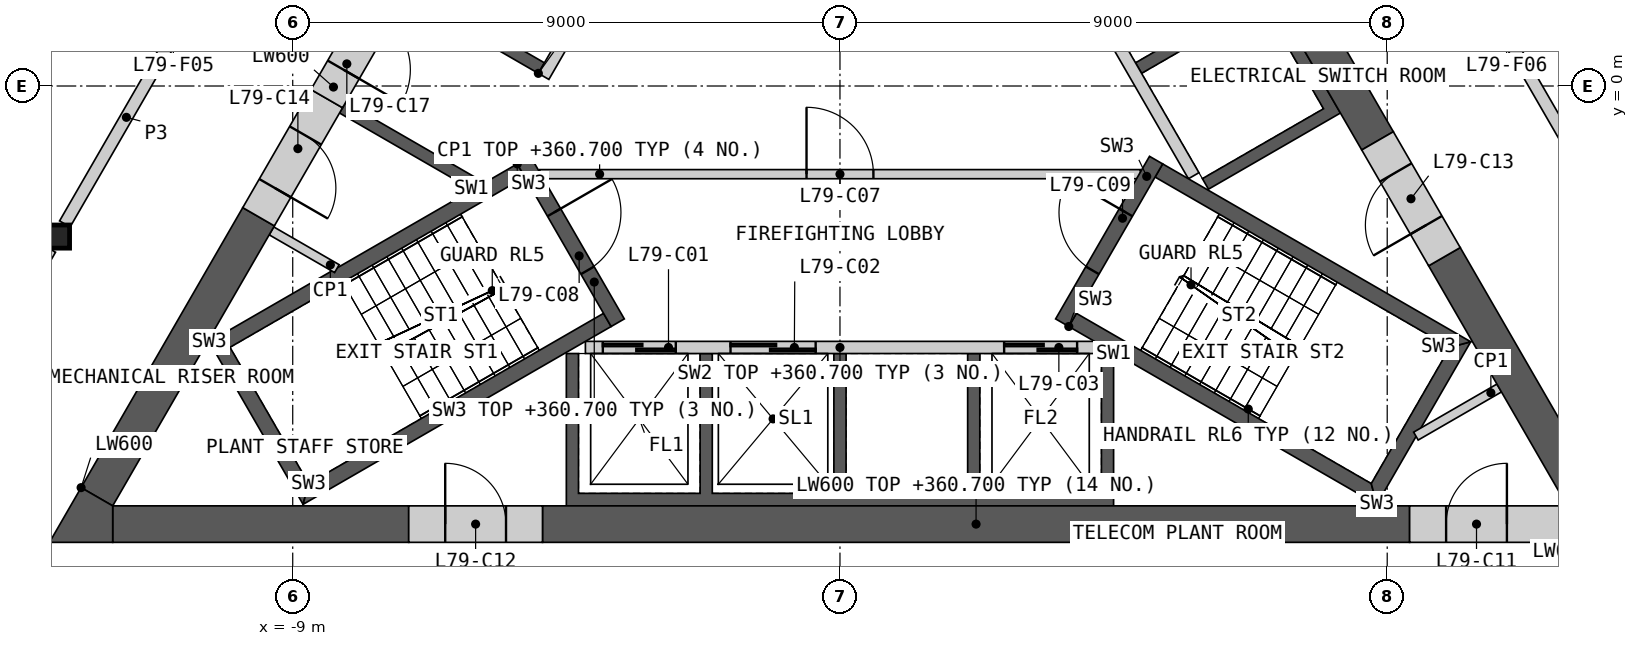
"""IFC4 building model, lengths in metres.
Left out: names, types, materials, properties, quantities, classifications, styles, units other than length and angle.
Written with IfcOpenShell. Run it as: python <this file> out.ifc"""

import sys

from ifc_helpers import new_model, si_unit, direction, frame, frame_2d, origin, origin_2d, place, context, subcontext, project, spatial, polyline, rectangle, i_section, outline, extrude, element, fill, save


model = new_model("IFC4")
c1 = context("Model", 3, precision=1e-05, world=origin(), true_north=direction((0.0, 1.0)))
c2 = subcontext(c1, "Body", "Model", "MODEL_VIEW")
j1 = project(units=[si_unit("LENGTHUNIT", "METRE"), si_unit("PLANEANGLEUNIT", "RADIAN")], contexts=[c1])
p1 = place(None, origin())
s1 = spatial("IfcSite", under=j1, at=p1, CompositionType="ELEMENT")
p2 = place(p1, origin())
s2 = spatial("IfcBuilding", under=s1, at=p2, CompositionType="ELEMENT")
p3 = place(p2, frame((0.0, 0.0, 356.0)))
s3 = spatial("IfcBuildingStorey", under=s2, at=p3, CompositionType="ELEMENT", Elevation=356.0)
p4 = place(p3, frame((-12.868, -2.476, 0.0), z_axis=(0.0, 0.0, 1.0), x_axis=(1.0, 0.0, 0.0)))
e1 = element("IfcColumn", 1, at=p4, inside=s3, PredefinedType="COLUMN", context=c2, shape_type="SweptSolid", body=[
    extrude(i_section(OverallWidth=0.396, OverallDepth=0.381, WebThickness=0.019, FlangeThickness=0.03, at=origin_2d()), origin(), (0.0, 0.0, 1.0), 5.0),
])
p5 = place(p3, origin())
e2 = element("IfcWall", 2, at=p5, inside=s3, PredefinedType="SHEAR", context=c2, shape_type="SweptSolid", body=[
    extrude(outline(polyline([(4.5, -4.4), (4.5, -6.906), (-4.5, -6.906), (-4.5, -4.4), (-4.3, -4.4), (-4.3, -6.7), (-2.3, -6.7), (-2.3, -4.4), (-2.1, -4.4), (-2.1, -6.7), (-0.1, -6.7), (-0.1, -4.4), (0.1, -4.4), (0.1, -6.7), (2.1, -6.7), (2.1, -4.4), (2.3, -4.4), (2.3, -6.7), (4.3, -6.7), (4.3, -4.4), (4.5, -4.4)])), origin(), (0.0, 0.0, 1.0), 4.7),
])
p6 = place(p3, frame((-4.187, -4.3, 0.0), z_axis=(0.0, 0.0, 1.0), x_axis=(1.0, 0.0, 0.0)))
e3 = element("IfcWall", 3, at=p6, inside=s3, PredefinedType="SOLIDWALL", context=c2, shape_type="SweptSolid", body=[
    extrude(rectangle(XDim=8.373, YDim=0.2, at=frame_2d((4.187, 0.0))), origin(), (0.0, 0.0, 1.0), 4.7),
])
p7 = place(p6, frame((0.287, 0.0, 0.0)))
e4 = element("IfcOpeningElement", 4, at=p7, cuts=e3, PredefinedType="OPENING", context=c2, shape_type="SweptSolid", body=[
    extrude(rectangle(XDim=1.2, YDim=2.1, at=frame_2d((0.6, 1.05))), frame((0.0, 0.11, 0.0), z_axis=(0.0, -1.0, 0.0), x_axis=(1.0, 0.0, 0.0)), (0.0, 0.0, 1.0), 0.22),
])
p8 = place(p6, frame((2.387, 0.0, 0.0)))
e5 = element("IfcOpeningElement", 5, at=p8, cuts=e3, PredefinedType="OPENING", context=c2, shape_type="SweptSolid", body=[
    extrude(rectangle(XDim=1.4, YDim=2.1, at=frame_2d((0.7, 1.05))), frame((0.0, 0.11, 0.0), z_axis=(0.0, -1.0, 0.0), x_axis=(1.0, 0.0, 0.0)), (0.0, 0.0, 1.0), 0.22),
])
p9 = place(p6, frame((6.887, 0.0, 0.0)))
e6 = element("IfcOpeningElement", 6, at=p9, cuts=e3, PredefinedType="OPENING", context=c2, shape_type="SweptSolid", body=[
    extrude(rectangle(XDim=1.2, YDim=2.1, at=frame_2d((0.6, 1.05))), frame((0.0, 0.11, 0.0), z_axis=(0.0, -1.0, 0.0), x_axis=(1.0, 0.0, 0.0)), (0.0, 0.0, 1.0), 0.22),
])
p10 = place(p3, origin())
e7 = element("IfcWall", 7, at=p10, inside=s3, PredefinedType="SHEAR", context=c2, shape_type="SweptSolid", body=[
    extrude(outline(polyline([(1.561, 6.097), (3.731, 7.35), (8.231, -0.444), (6.061, -1.697), (5.96, -1.524), (7.952, -0.374), (6.952, 1.358), (4.96, 0.208), (4.861, 0.381), (6.852, 1.531), (5.852, 3.263), (3.861, 2.113), (3.76, 2.287), (5.752, 3.437), (4.752, 5.169), (2.76, 4.019), (2.66, 4.192), (4.652, 5.342), (3.652, 7.074), (1.66, 5.924), (1.561, 6.097)])), origin(), (0.0, 0.0, 1.0), 4.7),
])
p11 = place(p3, frame((5.817, -1.476, 0.0), z_axis=(0.0, 0.0, 1.0), x_axis=(-0.500002616675, 0.866023893041, 0.0)))
e8 = element("IfcWall", 8, at=p11, inside=s3, PredefinedType="SOLIDWALL", context=c2, shape_type="SweptSolid", body=[
    extrude(rectangle(XDim=8.373, YDim=0.2, at=frame_2d((4.187, 0.0))), origin(), (0.0, 0.0, 1.0), 4.7),
])
p12 = place(p11, frame((7.037, 0.0, 0.0)))
e9 = element("IfcOpeningElement", 9, at=p12, cuts=e8, PredefinedType="OPENING", context=c2, shape_type="SweptSolid", body=[
    extrude(rectangle(XDim=0.9, YDim=2.1, at=frame_2d((0.45, 1.05))), frame((0.0, 0.11, 0.0), z_axis=(0.0, -1.0, 0.0), x_axis=(1.0, 0.0, 0.0)), (0.0, 0.0, 1.0), 0.22),
])
p13 = place(p3, origin())
e10 = element("IfcWall", 10, at=p13, inside=s3, PredefinedType="SHEAR", context=c2, shape_type="SweptSolid", body=[
    extrude(outline(polyline([(-6.061, -1.697), (-8.231, -0.444), (-8.131, -0.271), (-5.96, -1.524), (-6.061, -1.697)])), origin(), (0.0, 0.0, 1.0), 4.7),
])
p14 = place(p3, origin())
e11 = element("IfcWall", 11, at=p14, inside=s3, PredefinedType="SHEAR", context=c2, shape_type="SweptSolid", body=[
    extrude(outline(polyline([(-4.96, 0.208), (-7.131, 1.461), (-3.731, 7.35), (-1.561, 6.097), (-1.66, 5.924), (-3.652, 7.074), (-4.652, 5.342), (-2.66, 4.192), (-2.76, 4.019), (-4.752, 5.169), (-6.852, 1.531), (-4.861, 0.381), (-4.96, 0.208)])), origin(), (0.0, 0.0, 1.0), 4.7),
])
p15 = place(p3, frame((-1.631, 5.776, 0.0), z_axis=(0.0, 0.0, 1.0), x_axis=(-0.499992876559, -0.866029516466, 0.0)))
e12 = element("IfcWall", 12, at=p15, inside=s3, PredefinedType="SOLIDWALL", context=c2, shape_type="SweptSolid", body=[
    extrude(rectangle(XDim=6.486, YDim=0.2, at=frame_2d((3.243, 0.0))), origin(), (0.0, 0.0, 1.0), 4.7),
])
p16 = place(p15, frame((0.437, 0.0, 0.0)))
e13 = element("IfcOpeningElement", 13, at=p16, cuts=e12, PredefinedType="OPENING", context=c2, shape_type="SweptSolid", body=[
    extrude(rectangle(XDim=0.9, YDim=2.1, at=frame_2d((0.45, 1.05))), frame((0.0, 0.11, 0.0), z_axis=(0.0, -1.0, 0.0), x_axis=(1.0, 0.0, 0.0)), (0.0, 0.0, 1.0), 0.22),
])
p17 = place(p15, frame((3.737, 0.0, 0.0)))
e14 = element("IfcOpeningElement", 14, at=p17, cuts=e12, PredefinedType="OPENING", context=c2, shape_type="SweptSolid", body=[
    extrude(rectangle(XDim=0.9, YDim=2.1, at=frame_2d((0.45, 1.05))), frame((0.0, 0.11, 0.0), z_axis=(0.0, -1.0, 0.0), x_axis=(1.0, 0.0, 0.0)), (0.0, 0.0, 1.0), 0.22),
])
p18 = place(p3, frame((-4.941, -1.45, 0.0), z_axis=(0.0, 0.0, 1.0), x_axis=(1.0, 0.0, 0.0)))
e15 = element("IfcWall", 15, at=p18, inside=s3, PredefinedType="PARTITIONING", context=c2, shape_type="SweptSolid", body=[
    extrude(rectangle(XDim=9.882, YDim=0.15, at=frame_2d((4.941, 0.0))), origin(), (0.0, 0.0, 1.0), 4.7),
])
p19 = place(p18, frame((4.391, 0.0, 0.0)))
e16 = element("IfcOpeningElement", 16, at=p19, cuts=e15, PredefinedType="OPENING", context=c2, shape_type="SweptSolid", body=[
    extrude(rectangle(XDim=1.1, YDim=2.1, at=frame_2d((0.55, 1.05))), frame((0.0, 0.085, 0.0), z_axis=(0.0, -1.0, 0.0), x_axis=(1.0, 0.0, 0.0)), (0.0, 0.0, 1.0), 0.17),
])
p20 = place(p3, origin())
e17 = element("IfcWall", 17, at=p20, inside=s3, PredefinedType="SHEAR", context=c2, shape_type="SweptSolid", body=[
    extrude(outline(polyline([(-5.307, -1.281), (-10.374, -4.206), (-10.032, -4.298), (-5.182, -1.498), (-5.307, -1.281)])), origin(), (0.0, 0.0, 1.0), 4.7),
])
p21 = place(p3, origin())
e18 = element("IfcWall", 18, at=p21, inside=s3, PredefinedType="SHEAR", context=c2, shape_type="SweptSolid", body=[
    extrude(outline(polyline([(-10.374, -4.206), (-8.83, -6.881), (-8.738, -6.539), (-10.032, -4.298), (-10.374, -4.206)])), origin(), (0.0, 0.0, 1.0), 4.7),
])
p22 = place(p3, origin())
e19 = element("IfcWall", 19, at=p22, inside=s3, PredefinedType="SHEAR", context=c2, shape_type="SweptSolid", body=[
    extrude(outline(polyline([(-8.738, -6.539), (-8.83, -6.881), (-3.763, -3.956), (-3.888, -3.739), (-8.738, -6.539)])), origin(), (0.0, 0.0, 1.0), 4.7),
])
p23 = place(p3, frame((-5.199, -1.219, 0.0), z_axis=(0.0, 0.0, 1.0), x_axis=(0.499982516597, -0.866035497597, 0.0)))
e20 = element("IfcWall", 20, at=p23, inside=s3, PredefinedType="SHEAR", context=c2, shape_type="SweptSolid", body=[
    extrude(rectangle(XDim=3.088, YDim=0.25, at=frame_2d((1.544, 0.0))), origin(), (0.0, 0.0, 1.0), 4.7),
])
p24 = place(p23, frame((0.994, 0.0, 0.0)))
e21 = element("IfcOpeningElement", 21, at=p24, cuts=e20, PredefinedType="OPENING", context=c2, shape_type="SweptSolid", body=[
    extrude(rectangle(XDim=1.1, YDim=2.1, at=frame_2d((0.55, 1.05))), frame((0.0, 0.135, 0.0), z_axis=(0.0, -1.0, 0.0), x_axis=(1.0, 0.0, 0.0)), (0.0, 0.0, 1.0), 0.27),
])
p25 = place(p3, origin())
e22 = element("IfcWall", 22, at=p25, inside=s3, PredefinedType="SHEAR", context=c2, shape_type="SweptSolid", body=[
    extrude(outline(polyline([(3.763, -3.956), (8.83, -6.881), (8.738, -6.539), (3.888, -3.739), (3.763, -3.956)])), origin(), (0.0, 0.0, 1.0), 4.7),
])
p26 = place(p3, origin())
e23 = element("IfcWall", 23, at=p26, inside=s3, PredefinedType="SHEAR", context=c2, shape_type="SweptSolid", body=[
    extrude(outline(polyline([(8.83, -6.881), (10.374, -4.206), (10.032, -4.298), (8.738, -6.539), (8.83, -6.881)])), origin(), (0.0, 0.0, 1.0), 4.7),
])
p27 = place(p3, origin())
e24 = element("IfcWall", 24, at=p27, inside=s3, PredefinedType="SHEAR", context=c2, shape_type="SweptSolid", body=[
    extrude(outline(polyline([(10.032, -4.298), (10.374, -4.206), (5.307, -1.281), (5.182, -1.498), (10.032, -4.298)])), origin(), (0.0, 0.0, 1.0), 4.7),
])
p28 = place(p3, frame((3.655, -3.893, 0.0), z_axis=(0.0, 0.0, 1.0), x_axis=(0.499982516597, 0.866035497597, 0.0)))
e25 = element("IfcWall", 25, at=p28, inside=s3, PredefinedType="SHEAR", context=c2, shape_type="SweptSolid", body=[
    extrude(rectangle(XDim=3.088, YDim=0.25, at=frame_2d((1.544, 0.0))), origin(), (0.0, 0.0, 1.0), 4.7),
])
p29 = place(p28, frame((0.994, 0.0, 0.0)))
e26 = element("IfcOpeningElement", 26, at=p29, cuts=e25, PredefinedType="OPENING", context=c2, shape_type="SweptSolid", body=[
    extrude(rectangle(XDim=1.1, YDim=2.1, at=frame_2d((0.55, 1.05))), frame((0.0, 0.135, 0.0), z_axis=(0.0, -1.0, 0.0), x_axis=(1.0, 0.0, 0.0)), (0.0, 0.0, 1.0), 0.27),
])
p30 = place(p3, frame((-9.35, -2.383, 0.0), z_axis=(0.0, 0.0, 1.0), x_axis=(0.866057962423, -0.499943602543, 0.0)))
e27 = element("IfcWall", 27, at=p30, inside=s3, PredefinedType="PARTITIONING", context=c2, shape_type="SweptSolid", body=[
    extrude(rectangle(XDim=1.242, YDim=0.15, at=frame_2d((0.621, 0.0))), origin(), (0.0, 0.0, 1.0), 4.7),
])
p31 = place(p3, frame((10.842, -4.967, 0.0), z_axis=(0.0, 0.0, 1.0), x_axis=(-0.866098216386, -0.499873863663, 0.0)))
e28 = element("IfcWall", 28, at=p31, inside=s3, PredefinedType="PARTITIONING", context=c2, shape_type="SweptSolid", body=[
    extrude(rectangle(XDim=1.582, YDim=0.15, at=frame_2d((0.791, 0.0))), origin(), (0.0, 0.0, 1.0), 4.7),
])
p32 = place(p3, frame((-4.892, -7.206, 0.0), z_axis=(0.0, 0.0, 1.0), x_axis=(1.0, 0.0, 0.0)))
e29 = element("IfcWall", 29, at=p32, inside=s3, PredefinedType="SHEAR", context=c2, shape_type="SweptSolid", body=[
    extrude(rectangle(XDim=14.261, YDim=0.6, at=frame_2d((7.13, 0.0))), origin(), (0.0, 0.0, 1.0), 4.7),
])
p33 = place(p3, frame((-11.961, -7.206, 0.0), z_axis=(0.0, 0.0, 1.0), x_axis=(1.0, 0.0, 0.0)))
e30 = element("IfcWall", 30, at=p33, inside=s3, PredefinedType="SHEAR", context=c2, shape_type="SweptSolid", body=[
    extrude(rectangle(XDim=4.868, YDim=0.6, at=frame_2d((2.434, 0.0))), origin(), (0.0, 0.0, 1.0), 4.7),
])
p34 = place(p3, frame((8.841, -0.902, 0.0), z_axis=(0.0, 0.0, 1.0), x_axis=(-0.499995618375, 0.866027933502, 0.0)))
e31 = element("IfcWall", 31, at=p34, inside=s3, PredefinedType="SHEAR", context=c2, shape_type="SweptSolid", body=[
    extrude(rectangle(XDim=14.571, YDim=0.6, at=frame_2d((7.285, 0.0))), origin(), (0.0, 0.0, 1.0), 4.7),
])
p35 = place(p3, frame((12.221, -6.756, 0.0), z_axis=(0.0, 0.0, 1.0), x_axis=(-0.500020646047, 0.866013483456, 0.0)))
e32 = element("IfcWall", 32, at=p35, inside=s3, PredefinedType="SHEAR", context=c2, shape_type="SweptSolid", body=[
    extrude(rectangle(XDim=4.559, YDim=0.6, at=frame_2d((2.28, 0.0))), origin(), (0.0, 0.0, 1.0), 4.7),
])
p36 = place(p3, frame((-9.562, -2.15, 0.0), z_axis=(0.0, 0.0, 1.0), x_axis=(-0.500015214976, -0.866016619236, 0.0)))
e33 = element("IfcWall", 33, at=p36, inside=s3, PredefinedType="SHEAR", context=c2, shape_type="SweptSolid", body=[
    extrude(rectangle(XDim=5.318, YDim=0.6, at=frame_2d((2.659, 0.0))), origin(), (0.0, 0.0, 1.0), 4.7),
])
p37 = place(p3, origin())
e34 = element("IfcWall", 34, at=p37, inside=s3, PredefinedType="SHEAR", context=c2, shape_type="SweptSolid", body=[
    extrude(outline(polyline([(-12.48, -6.606), (-11.961, -6.906), (-11.961, -7.506), (-13.0, -7.506), (-12.48, -6.606)])), origin(), (0.0, 0.0, 1.0), 4.7),
])
p38 = place(p3, frame((9.369, -7.206, 0.0), z_axis=(0.0, 0.0, 1.0), x_axis=(1.0, 0.0, 0.0)))
e35 = element("IfcWall", 35, at=p38, inside=s3, PredefinedType="SHEAR", context=c2, shape_type="SweptSolid", body=[
    extrude(rectangle(XDim=2.592, YDim=0.6, at=frame_2d((1.296, 0.0))), origin(), (0.0, 0.0, 1.0), 4.7),
])
p39 = place(p38, frame((0.6, 0.0, 0.0)))
e36 = element("IfcOpeningElement", 36, at=p39, cuts=e35, PredefinedType="OPENING", context=c2, shape_type="SweptSolid", body=[
    extrude(rectangle(XDim=1.0, YDim=2.1, at=frame_2d((0.5, 1.05))), frame((0.0, 0.31, 0.0), z_axis=(0.0, -1.0, 0.0), x_axis=(1.0, 0.0, 0.0)), (0.0, 0.0, 1.0), 0.62),
])
p40 = place(p3, frame((-7.092, -7.206, 0.0), z_axis=(0.0, 0.0, 1.0), x_axis=(1.0, 0.0, 0.0)))
e37 = element("IfcWall", 37, at=p40, inside=s3, PredefinedType="SHEAR", context=c2, shape_type="SweptSolid", body=[
    extrude(rectangle(XDim=2.2, YDim=0.6, at=frame_2d((1.1, 0.0))), origin(), (0.0, 0.0, 1.0), 4.7),
])
p41 = place(p40, frame((0.6, 0.0, 0.0)))
e38 = element("IfcOpeningElement", 38, at=p41, cuts=e37, PredefinedType="OPENING", context=c2, shape_type="SweptSolid", body=[
    extrude(rectangle(XDim=1.0, YDim=2.1, at=frame_2d((0.5, 1.05))), frame((0.0, 0.31, 0.0), z_axis=(0.0, -1.0, 0.0), x_axis=(1.0, 0.0, 0.0)), (0.0, 0.0, 1.0), 0.62),
])
p42 = place(p3, frame((9.941, -2.807, 0.0), z_axis=(0.0, 0.0, 1.0), x_axis=(-0.499994660107, 0.866028486751, 0.0)))
e39 = element("IfcWall", 39, at=p42, inside=s3, PredefinedType="SHEAR", context=c2, shape_type="SweptSolid", body=[
    extrude(rectangle(XDim=2.2, YDim=0.6, at=frame_2d((1.1, 0.0))), origin(), (0.0, 0.0, 1.0), 4.7),
])
p43 = place(p42, frame((0.6, 0.0, 0.0)))
e40 = element("IfcOpeningElement", 40, at=p43, cuts=e39, PredefinedType="OPENING", context=c2, shape_type="SweptSolid", body=[
    extrude(rectangle(XDim=1.0, YDim=2.1, at=frame_2d((0.5, 1.05))), frame((0.0, 0.31, 0.0), z_axis=(0.0, -1.0, 0.0), x_axis=(1.0, 0.0, 0.0)), (0.0, 0.0, 1.0), 0.62),
])
p44 = place(p3, frame((-8.44, -0.208, 0.0), z_axis=(0.0, 0.0, 1.0), x_axis=(-0.500001951578, -0.866024277037, 0.0)))
e41 = element("IfcWall", 41, at=p44, inside=s3, PredefinedType="SHEAR", context=c2, shape_type="SweptSolid", body=[
    extrude(rectangle(XDim=2.243, YDim=0.6, at=frame_2d((1.122, 0.0))), origin(), (0.0, 0.0, 1.0), 4.7),
])
p45 = place(p44, frame((0.7, 0.0, 0.0)))
e42 = element("IfcOpeningElement", 42, at=p45, cuts=e41, PredefinedType="OPENING", context=c2, shape_type="SweptSolid", body=[
    extrude(rectangle(XDim=1.0, YDim=2.1, at=frame_2d((0.5, 1.05))), frame((0.0, 0.31, 0.0), z_axis=(0.0, -1.0, 0.0), x_axis=(1.0, 0.0, 0.0)), (0.0, 0.0, 1.0), 0.62),
])
p46 = place(p3, frame((-7.34, 1.698, 0.0), z_axis=(0.0, 0.0, 1.0), x_axis=(-0.50002983664, -0.866008176907, 0.0)))
e43 = element("IfcWall", 43, at=p46, inside=s3, PredefinedType="SHEAR", context=c2, shape_type="SweptSolid", body=[
    extrude(rectangle(XDim=2.2, YDim=0.6, at=frame_2d((1.1, 0.0))), origin(), (0.0, 0.0, 1.0), 4.7),
])
p47 = place(p46, frame((0.55, 0.0, 0.0)))
e44 = element("IfcOpeningElement", 44, at=p47, cuts=e43, PredefinedType="OPENING", context=c2, shape_type="SweptSolid", body=[
    extrude(rectangle(XDim=1.1, YDim=2.1, at=frame_2d((0.55, 1.05))), frame((0.0, 0.31, 0.0), z_axis=(0.0, -1.0, 0.0), x_axis=(1.0, 0.0, 0.0)), (0.0, 0.0, 1.0), 0.62),
])
p48 = place(p3, frame((-12.748, -2.269, 0.0), z_axis=(0.0, 0.0, 1.0), x_axis=(0.499984266882, 0.866034487114, 0.0)))
e45 = element("IfcWall", 45, at=p48, inside=s3, PredefinedType="PARTITIONING", context=c2, shape_type="SweptSolid", body=[
    extrude(rectangle(XDim=8.099, YDim=0.2, at=frame_2d((4.049, 0.0))), origin(), (0.0, 0.0, 1.0), 4.7),
])
p49 = place(p48, frame((3.449, 0.0, 0.0)))
e46 = element("IfcOpeningElement", 46, at=p49, cuts=e45, PredefinedType="OPENING", context=c2, shape_type="SweptSolid", body=[
    extrude(rectangle(XDim=1.2, YDim=2.1, at=frame_2d((0.6, 1.05))), frame((0.0, 0.11, 0.0), z_axis=(0.0, -1.0, 0.0), x_axis=(1.0, 0.0, 0.0)), (0.0, 0.0, 1.0), 0.22),
])
p50 = place(p3, frame((8.698, 4.745, 0.0), z_axis=(0.0, 0.0, 1.0), x_axis=(0.499984266882, -0.866034487114, 0.0)))
e47 = element("IfcWall", 47, at=p50, inside=s3, PredefinedType="PARTITIONING", context=c2, shape_type="SweptSolid", body=[
    extrude(rectangle(XDim=8.099, YDim=0.2, at=frame_2d((4.049, 0.0))), origin(), (0.0, 0.0, 1.0), 4.7),
])
p51 = place(p50, frame((3.449, 0.0, 0.0)))
e48 = element("IfcOpeningElement", 48, at=p51, cuts=e47, PredefinedType="OPENING", context=c2, shape_type="SweptSolid", body=[
    extrude(rectangle(XDim=1.2, YDim=2.1, at=frame_2d((0.6, 1.05))), frame((0.0, 0.11, 0.0), z_axis=(0.0, -1.0, 0.0), x_axis=(1.0, 0.0, 0.0)), (0.0, 0.0, 1.0), 0.22),
])
p52 = place(p3, frame((-15.244, -6.592, 0.0), z_axis=(0.0, 0.0, 1.0), x_axis=(0.49999094734, 0.866030630277, 0.0)))
e49 = element("IfcWall", 49, at=p52, inside=s3, PredefinedType="PARTITIONING", context=c2, shape_type="SweptSolid", body=[
    extrude(rectangle(XDim=4.513, YDim=0.2, at=frame_2d((2.256, 0.0))), origin(), (0.0, 0.0, 1.0), 4.7),
])
p53 = place(p7, origin())
e50 = element("IfcDoor", 50, at=p53, inside=s3, OperationType="SLIDING_TO_LEFT", PredefinedType="DOOR", context=c2, shape_type="SweptSolid", body=[
    extrude(rectangle(XDim=1.2, YDim=2.1, at=frame_2d((0.6, 1.05))), frame((0.0, 0.025, 0.0), z_axis=(0.0, -1.0, 0.0), x_axis=(1.0, 0.0, 0.0)), (0.0, 0.0, 1.0), 0.05),
])
fill(e4, e50)
p54 = place(p8, origin())
e51 = element("IfcDoor", 51, at=p54, inside=s3, OperationType="SLIDING_TO_LEFT", PredefinedType="DOOR", context=c2, shape_type="SweptSolid", body=[
    extrude(rectangle(XDim=1.4, YDim=2.1, at=frame_2d((0.7, 1.05))), frame((0.0, 0.025, 0.0), z_axis=(0.0, -1.0, 0.0), x_axis=(1.0, 0.0, 0.0)), (0.0, 0.0, 1.0), 0.05),
])
fill(e5, e51)
p55 = place(p9, origin())
e52 = element("IfcDoor", 52, at=p55, inside=s3, OperationType="SLIDING_TO_LEFT", PredefinedType="DOOR", context=c2, shape_type="SweptSolid", body=[
    extrude(rectangle(XDim=1.2, YDim=2.1, at=frame_2d((0.6, 1.05))), frame((0.0, 0.025, 0.0), z_axis=(0.0, -1.0, 0.0), x_axis=(1.0, 0.0, 0.0)), (0.0, 0.0, 1.0), 0.05),
])
fill(e6, e52)
p56 = place(p19, origin())
e53 = element("IfcDoor", 53, at=p56, inside=s3, OperationType="SINGLE_SWING_LEFT", PredefinedType="DOOR", context=c2, shape_type="SweptSolid", body=[
    extrude(rectangle(XDim=1.1, YDim=2.1, at=frame_2d((0.55, 1.05))), frame((0.0, 0.025, 0.0), z_axis=(0.0, -1.0, 0.0), x_axis=(1.0, 0.0, 0.0)), (0.0, 0.0, 1.0), 0.05),
])
fill(e16, e53)
p57 = place(p24, origin())
e54 = element("IfcDoor", 54, at=p57, inside=s3, OperationType="SINGLE_SWING_LEFT", PredefinedType="DOOR", context=c2, shape_type="SweptSolid", body=[
    extrude(rectangle(XDim=1.1, YDim=2.1, at=frame_2d((0.55, 1.05))), frame((0.0, 0.025, 0.0), z_axis=(0.0, -1.0, 0.0), x_axis=(1.0, 0.0, 0.0)), (0.0, 0.0, 1.0), 0.05),
])
fill(e21, e54)
p58 = place(p29, origin())
e55 = element("IfcDoor", 55, at=p58, inside=s3, OperationType="SINGLE_SWING_RIGHT", PredefinedType="DOOR", context=c2, shape_type="SweptSolid", body=[
    extrude(rectangle(XDim=1.1, YDim=2.1, at=frame_2d((0.55, 1.05))), frame((0.0, 0.025, 0.0), z_axis=(0.0, -1.0, 0.0), x_axis=(1.0, 0.0, 0.0)), (0.0, 0.0, 1.0), 0.05),
])
fill(e26, e55)
p59 = place(p39, origin())
e56 = element("IfcDoor", 56, at=p59, inside=s3, OperationType="SINGLE_SWING_RIGHT", PredefinedType="DOOR", context=c2, shape_type="SweptSolid", body=[
    extrude(rectangle(XDim=1.0, YDim=2.1, at=frame_2d((0.5, 1.05))), frame((0.0, 0.055, 0.0), z_axis=(0.0, -1.0, 0.0), x_axis=(1.0, 0.0, 0.0)), (0.0, 0.0, 1.0), 0.05),
])
fill(e36, e56)
p60 = place(p41, origin())
e57 = element("IfcDoor", 57, at=p60, inside=s3, OperationType="SINGLE_SWING_LEFT", PredefinedType="DOOR", context=c2, shape_type="SweptSolid", body=[
    extrude(rectangle(XDim=1.0, YDim=2.1, at=frame_2d((0.5, 1.05))), frame((0.0, 0.055, 0.0), z_axis=(0.0, -1.0, 0.0), x_axis=(1.0, 0.0, 0.0)), (0.0, 0.0, 1.0), 0.05),
])
fill(e38, e57)
p61 = place(p43, origin())
e58 = element("IfcDoor", 58, at=p61, inside=s3, OperationType="SINGLE_SWING_LEFT", PredefinedType="DOOR", context=c2, shape_type="SweptSolid", body=[
    extrude(rectangle(XDim=1.0, YDim=2.1, at=frame_2d((0.5, 1.05))), frame((0.0, 0.055, 0.0), z_axis=(0.0, -1.0, 0.0), x_axis=(1.0, 0.0, 0.0)), (0.0, 0.0, 1.0), 0.05),
])
fill(e40, e58)
p62 = place(p45, origin())
e59 = element("IfcDoor", 59, at=p62, inside=s3, OperationType="SINGLE_SWING_RIGHT", PredefinedType="DOOR", context=c2, shape_type="SweptSolid", body=[
    extrude(rectangle(XDim=1.0, YDim=2.1, at=frame_2d((0.5, 1.05))), frame((0.0, 0.055, 0.0), z_axis=(0.0, -1.0, 0.0), x_axis=(1.0, 0.0, 0.0)), (0.0, 0.0, 1.0), 0.05),
])
fill(e42, e59)
p63 = place(p47, origin())
e60 = element("IfcDoor", 60, at=p63, inside=s3, OperationType="SINGLE_SWING_RIGHT", PredefinedType="DOOR", context=c2, shape_type="SweptSolid", body=[
    extrude(rectangle(XDim=1.1, YDim=2.1, at=frame_2d((0.55, 1.05))), frame((0.0, 0.055, 0.0), z_axis=(0.0, -1.0, 0.0), x_axis=(1.0, 0.0, 0.0)), (0.0, 0.0, 1.0), 0.05),
])
fill(e44, e60)
save(model, sys.argv[1])
